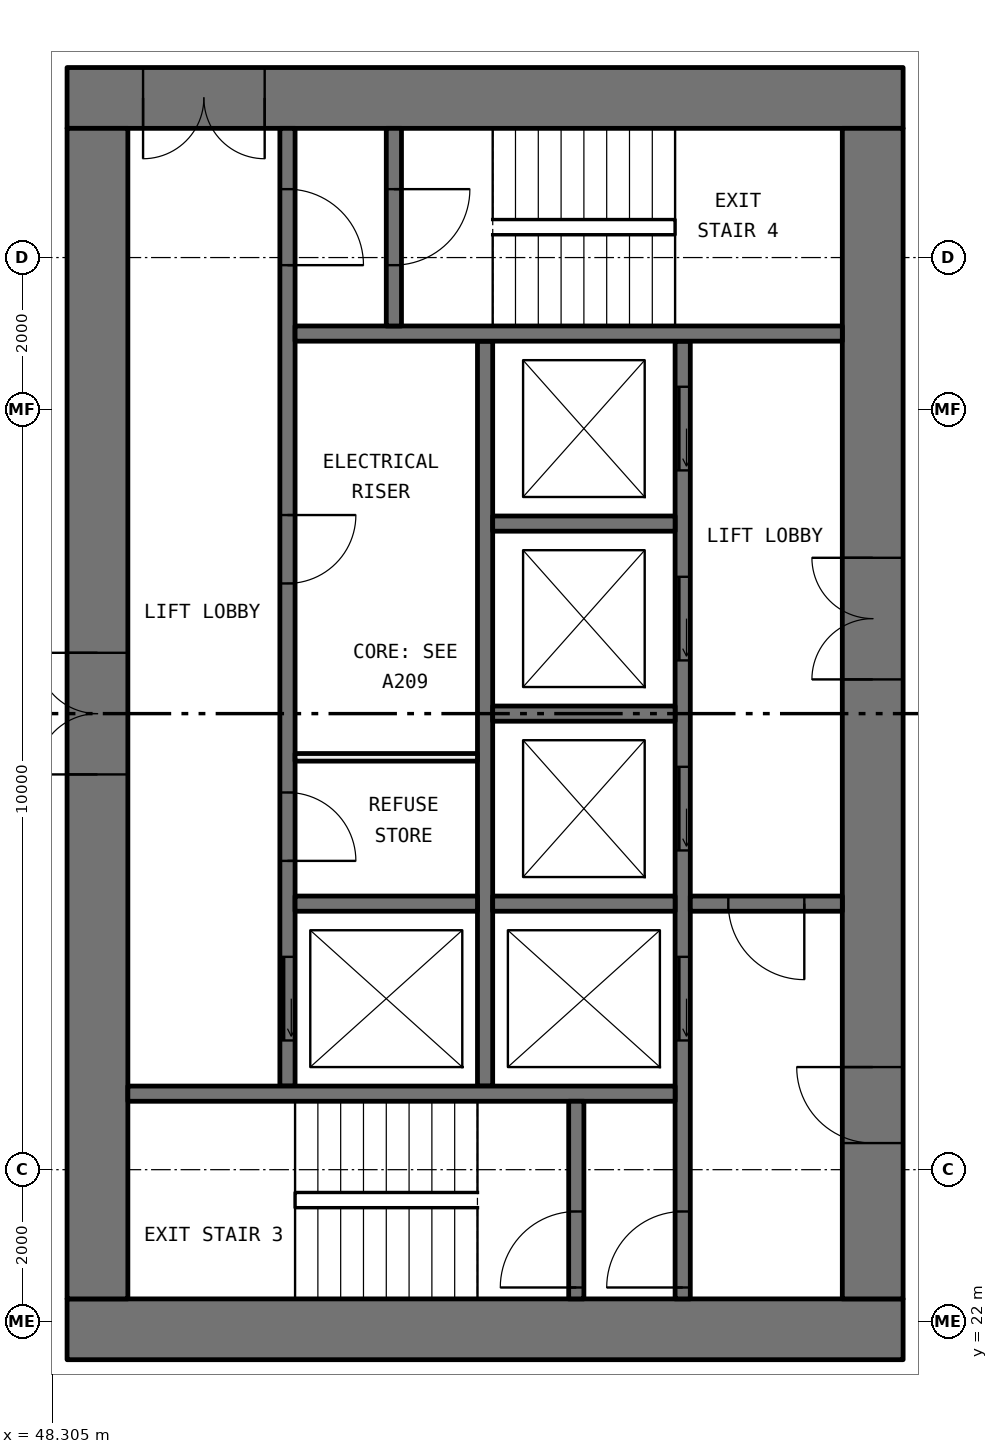
"""IFC4 building model, lengths in metres.
Left out: names, types, materials, properties, quantities, classifications, styles, units other than length and angle.
Written with IfcOpenShell. Run it as: python <this file> out.ifc"""

import sys

from ifc_helpers import new_model, si_unit, direction, frame, frame_2d, origin, place, context, subcontext, project, spatial, rectangle, extrude, element, fill, save


model = new_model("IFC4")
c1 = context("Model", 3, precision=1e-05, world=origin(), true_north=direction((0.0, 1.0)))
c2 = subcontext(c1, "Body", "Model", "MODEL_VIEW")
j1 = project(units=[si_unit("LENGTHUNIT", "METRE"), si_unit("PLANEANGLEUNIT", "RADIAN")], contexts=[c1])
p1 = place(None, origin())
s1 = spatial("IfcSite", under=j1, at=p1, CompositionType="ELEMENT")
p2 = place(p1, origin())
s2 = spatial("IfcBuilding", under=s1, at=p2, CompositionType="ELEMENT")
p3 = place(p2, frame((0.0, 0.0, 40.35)))
s3 = spatial("IfcBuildingStorey", under=s2, at=p3, CompositionType="ELEMENT", Elevation=40.35)
p4 = place(p3, frame((59.5, 21.9, 0.0), z_axis=(0.0, 0.0, 1.0), x_axis=(-1.0, 0.0, 0.0)))
e1 = element("IfcWall", 1, at=p4, inside=s3, PredefinedType="SHEAR", context=c2, shape_type="SweptSolid", body=[
    extrude(rectangle(XDim=11.0, YDim=0.8, at=frame_2d((5.5, 0.0))), origin(), (0.0, 0.0, 1.0), 3.05),
])
p5 = place(p3, frame((59.5, 38.1, 0.0), z_axis=(0.0, 0.0, 1.0), x_axis=(-1.0, 0.0, 0.0)))
e2 = element("IfcWall", 2, at=p5, inside=s3, PredefinedType="SHEAR", context=c2, shape_type="SweptSolid", body=[
    extrude(rectangle(XDim=11.0, YDim=0.8, at=frame_2d((5.5, 0.0))), origin(), (0.0, 0.0, 1.0), 3.05),
])
p6 = place(p5, frame((8.4, 0.0, 0.0)))
e3 = element("IfcOpeningElement", 3, at=p6, cuts=e2, PredefinedType="OPENING", context=c2, shape_type="SweptSolid", body=[
    extrude(rectangle(XDim=1.6, YDim=2.1, at=frame_2d((0.8, 1.05))), frame((0.0, 0.41, 0.0), z_axis=(0.0, -1.0, 0.0), x_axis=(1.0, 0.0, 0.0)), (0.0, 0.0, 1.0), 0.82),
])
p7 = place(p3, frame((59.1, 22.3, 0.0), z_axis=(0.0, 0.0, 1.0), x_axis=(0.0, 1.0, 0.0)))
e4 = element("IfcWall", 4, at=p7, inside=s3, PredefinedType="SHEAR", context=c2, shape_type="SweptSolid", body=[
    extrude(rectangle(XDim=15.4, YDim=0.8, at=frame_2d((7.7, 0.0))), origin(), (0.0, 0.0, 1.0), 3.05),
])
p8 = place(p7, frame((8.15, 0.0, 0.0)))
e5 = element("IfcOpeningElement", 5, at=p8, cuts=e4, PredefinedType="OPENING", context=c2, shape_type="SweptSolid", body=[
    extrude(rectangle(XDim=1.6, YDim=2.1, at=frame_2d((0.8, 1.05))), frame((0.0, 0.41, 0.0), z_axis=(0.0, -1.0, 0.0), x_axis=(1.0, 0.0, 0.0)), (0.0, 0.0, 1.0), 0.82),
])
p9 = place(p7, frame((2.05, 0.0, 0.0)))
e6 = element("IfcOpeningElement", 6, at=p9, cuts=e4, PredefinedType="OPENING", context=c2, shape_type="SweptSolid", body=[
    extrude(rectangle(XDim=1.0, YDim=2.1, at=frame_2d((0.5, 1.05))), frame((0.0, 0.41, 0.0), z_axis=(0.0, -1.0, 0.0), x_axis=(1.0, 0.0, 0.0)), (0.0, 0.0, 1.0), 0.82),
])
p10 = place(p3, frame((48.9, 22.3, 0.0), z_axis=(0.0, 0.0, 1.0), x_axis=(0.0, 1.0, 0.0)))
e7 = element("IfcWall", 7, at=p10, inside=s3, PredefinedType="SHEAR", context=c2, shape_type="SweptSolid", body=[
    extrude(rectangle(XDim=15.4, YDim=0.8, at=frame_2d((7.7, 0.0))), origin(), (0.0, 0.0, 1.0), 3.05),
])
p11 = place(p10, frame((6.9, 0.0, 0.0)))
e8 = element("IfcOpeningElement", 8, at=p11, cuts=e7, PredefinedType="OPENING", context=c2, shape_type="SweptSolid", body=[
    extrude(rectangle(XDim=1.6, YDim=2.1, at=frame_2d((0.8, 1.05))), frame((0.0, 0.41, 0.0), z_axis=(0.0, -1.0, 0.0), x_axis=(1.0, 0.0, 0.0)), (0.0, 0.0, 1.0), 0.82),
])
p12 = place(p3, frame((56.6, 22.3, 0.0), z_axis=(0.0, 0.0, 1.0), x_axis=(0.0, 1.0, 0.0)))
e9 = element("IfcWall", 9, at=p12, inside=s3, PredefinedType="SOLIDWALL", context=c2, shape_type="SweptSolid", body=[
    extrude(rectangle(XDim=12.6, YDim=0.2, at=frame_2d((6.3, 0.0))), origin(), (0.0, 0.0, 1.0), 3.05),
])
p13 = place(p12, frame((3.4, 0.0, 0.0)))
e10 = element("IfcOpeningElement", 10, at=p13, cuts=e9, PredefinedType="OPENING", context=c2, shape_type="SweptSolid", body=[
    extrude(rectangle(XDim=1.1, YDim=2.1, at=frame_2d((0.55, 1.05))), frame((0.0, 0.11, 0.0), z_axis=(0.0, -1.0, 0.0), x_axis=(1.0, 0.0, 0.0)), (0.0, 0.0, 1.0), 0.22),
])
p14 = place(p12, frame((5.9, 0.0, 0.0)))
e11 = element("IfcOpeningElement", 11, at=p14, cuts=e9, PredefinedType="OPENING", context=c2, shape_type="SweptSolid", body=[
    extrude(rectangle(XDim=1.1, YDim=2.1, at=frame_2d((0.55, 1.05))), frame((0.0, 0.11, 0.0), z_axis=(0.0, -1.0, 0.0), x_axis=(1.0, 0.0, 0.0)), (0.0, 0.0, 1.0), 0.22),
])
p15 = place(p12, frame((8.4, 0.0, 0.0)))
e12 = element("IfcOpeningElement", 12, at=p15, cuts=e9, PredefinedType="OPENING", context=c2, shape_type="SweptSolid", body=[
    extrude(rectangle(XDim=1.1, YDim=2.1, at=frame_2d((0.55, 1.05))), frame((0.0, 0.11, 0.0), z_axis=(0.0, -1.0, 0.0), x_axis=(1.0, 0.0, 0.0)), (0.0, 0.0, 1.0), 0.22),
])
p16 = place(p12, frame((10.9, 0.0, 0.0)))
e13 = element("IfcOpeningElement", 13, at=p16, cuts=e9, PredefinedType="OPENING", context=c2, shape_type="SweptSolid", body=[
    extrude(rectangle(XDim=1.1, YDim=2.1, at=frame_2d((0.55, 1.05))), frame((0.0, 0.11, 0.0), z_axis=(0.0, -1.0, 0.0), x_axis=(1.0, 0.0, 0.0)), (0.0, 0.0, 1.0), 0.22),
])
p17 = place(p12, frame((0.15, 0.0, 0.0)))
e14 = element("IfcOpeningElement", 14, at=p17, cuts=e9, PredefinedType="OPENING", context=c2, shape_type="SweptSolid", body=[
    extrude(rectangle(XDim=1.0, YDim=2.1, at=frame_2d((0.5, 1.05))), frame((0.0, 0.11, 0.0), z_axis=(0.0, -1.0, 0.0), x_axis=(1.0, 0.0, 0.0)), (0.0, 0.0, 1.0), 0.22),
])
p18 = place(p3, frame((51.4, 25.1, 0.0), z_axis=(0.0, 0.0, 1.0), x_axis=(0.0, 1.0, 0.0)))
e15 = element("IfcWall", 15, at=p18, inside=s3, PredefinedType="SOLIDWALL", context=c2, shape_type="SweptSolid", body=[
    extrude(rectangle(XDim=12.6, YDim=0.2, at=frame_2d((6.3, 0.0))), origin(), (0.0, 0.0, 1.0), 3.05),
])
p19 = place(p18, frame((0.6, 0.0, 0.0)))
e16 = element("IfcOpeningElement", 16, at=p19, cuts=e15, PredefinedType="OPENING", context=c2, shape_type="SweptSolid", body=[
    extrude(rectangle(XDim=1.1, YDim=2.1, at=frame_2d((0.55, 1.05))), frame((0.0, 0.11, 0.0), z_axis=(0.0, -1.0, 0.0), x_axis=(1.0, 0.0, 0.0)), (0.0, 0.0, 1.0), 0.22),
])
p20 = place(p18, frame((10.8, 0.0, 0.0)))
e17 = element("IfcOpeningElement", 17, at=p20, cuts=e15, PredefinedType="OPENING", context=c2, shape_type="SweptSolid", body=[
    extrude(rectangle(XDim=1.0, YDim=2.1, at=frame_2d((0.5, 1.05))), frame((0.0, 0.11, 0.0), z_axis=(0.0, -1.0, 0.0), x_axis=(1.0, 0.0, 0.0)), (0.0, 0.0, 1.0), 0.22),
])
p21 = place(p18, frame((2.962, 0.0, 0.0)))
e18 = element("IfcOpeningElement", 18, at=p21, cuts=e15, PredefinedType="OPENING", context=c2, shape_type="SweptSolid", body=[
    extrude(rectangle(XDim=0.9, YDim=2.1, at=frame_2d((0.45, 1.05))), frame((0.0, 0.11, 0.0), z_axis=(0.0, -1.0, 0.0), x_axis=(1.0, 0.0, 0.0)), (0.0, 0.0, 1.0), 0.22),
])
p22 = place(p18, frame((6.613, 0.0, 0.0)))
e19 = element("IfcOpeningElement", 19, at=p22, cuts=e15, PredefinedType="OPENING", context=c2, shape_type="SweptSolid", body=[
    extrude(rectangle(XDim=0.9, YDim=2.1, at=frame_2d((0.45, 1.05))), frame((0.0, 0.11, 0.0), z_axis=(0.0, -1.0, 0.0), x_axis=(1.0, 0.0, 0.0)), (0.0, 0.0, 1.0), 0.22),
])
p23 = place(p3, frame((54.0, 25.1, 0.0), z_axis=(0.0, 0.0, 1.0), x_axis=(0.0, 1.0, 0.0)))
e20 = element("IfcWall", 20, at=p23, inside=s3, PredefinedType="SOLIDWALL", context=c2, shape_type="SweptSolid", body=[
    extrude(rectangle(XDim=9.8, YDim=0.2, at=frame_2d((4.9, 0.0))), origin(), (0.0, 0.0, 1.0), 3.05),
])
for number, where, z_axis, x_axis in (
    (21, (56.5, 25.0, 0.0), (0.0, 0.0, 1.0), (-1.0, 0.0, 0.0)),
    (22, (58.7, 35.0, 0.0), (0.0, 0.0, 1.0), (-1.0, 0.0, 0.0)),
):
    element("IfcWall", number, at=place(p3, frame(where, z_axis=z_axis, x_axis=x_axis)), inside=s3, PredefinedType="SOLIDWALL", context=c2, shape_type="SweptSolid", body=[
        extrude(rectangle(XDim=7.2, YDim=0.2, at=frame_2d((3.6, 0.0))), origin(), (0.0, 0.0, 1.0), 3.05),
    ])
p24 = place(p3, frame((58.7, 27.5, 0.0), z_axis=(0.0, 0.0, 1.0), x_axis=(-1.0, 0.0, 0.0)))
e23 = element("IfcWall", 23, at=p24, inside=s3, PredefinedType="SOLIDWALL", context=c2, shape_type="SweptSolid", body=[
    extrude(rectangle(XDim=2.0, YDim=0.2, at=frame_2d((1.0, 0.0))), origin(), (0.0, 0.0, 1.0), 3.05),
])
p25 = place(p24, frame((0.5, 0.0, 0.0)))
e24 = element("IfcOpeningElement", 24, at=p25, cuts=e23, PredefinedType="OPENING", context=c2, shape_type="SweptSolid", body=[
    extrude(rectangle(XDim=1.0, YDim=2.1, at=frame_2d((0.5, 1.05))), frame((0.0, 0.11, 0.0), z_axis=(0.0, -1.0, 0.0), x_axis=(1.0, 0.0, 0.0)), (0.0, 0.0, 1.0), 0.22),
])
p26 = place(p3, frame((55.2, 22.3, 0.0), z_axis=(0.0, 0.0, 1.0), x_axis=(0.0, 1.0, 0.0)))
e25 = element("IfcWall", 25, at=p26, inside=s3, PredefinedType="SOLIDWALL", context=c2, shape_type="SweptSolid", body=[
    extrude(rectangle(XDim=2.6, YDim=0.2, at=frame_2d((1.3, 0.0))), origin(), (0.0, 0.0, 1.0), 3.05),
])
p27 = place(p26, frame((0.15, 0.0, 0.0)))
e26 = element("IfcOpeningElement", 26, at=p27, cuts=e25, PredefinedType="OPENING", context=c2, shape_type="SweptSolid", body=[
    extrude(rectangle(XDim=1.0, YDim=2.1, at=frame_2d((0.5, 1.05))), frame((0.0, 0.11, 0.0), z_axis=(0.0, -1.0, 0.0), x_axis=(1.0, 0.0, 0.0)), (0.0, 0.0, 1.0), 0.22),
])
p28 = place(p3, frame((52.8, 35.1, 0.0), z_axis=(0.0, 0.0, 1.0), x_axis=(0.0, 1.0, 0.0)))
e27 = element("IfcWall", 27, at=p28, inside=s3, PredefinedType="SOLIDWALL", context=c2, shape_type="SweptSolid", body=[
    extrude(rectangle(XDim=2.6, YDim=0.2, at=frame_2d((1.3, 0.0))), origin(), (0.0, 0.0, 1.0), 3.05),
])
p29 = place(p28, frame((0.8, 0.0, 0.0)))
e28 = element("IfcOpeningElement", 28, at=p29, cuts=e27, PredefinedType="OPENING", context=c2, shape_type="SweptSolid", body=[
    extrude(rectangle(XDim=1.0, YDim=2.1, at=frame_2d((0.5, 1.05))), frame((0.0, 0.11, 0.0), z_axis=(0.0, -1.0, 0.0), x_axis=(1.0, 0.0, 0.0)), (0.0, 0.0, 1.0), 0.22),
])
for number, where, z_axis, x_axis in (
    (29, (56.5, 27.5, 0.0), (0.0, 0.0, 1.0), (-1.0, 0.0, 0.0)),
    (30, (56.5, 30.0, 0.0), (0.0, 0.0, 1.0), (-1.0, 0.0, 0.0)),
    (31, (56.5, 32.5, 0.0), (0.0, 0.0, 1.0), (-1.0, 0.0, 0.0)),
    (32, (53.9, 27.5, 0.0), (0.0, 0.0, 1.0), (-1.0, 0.0, 0.0)),
):
    element("IfcWall", number, at=place(p3, frame(where, z_axis=z_axis, x_axis=x_axis)), inside=s3, PredefinedType="SOLIDWALL", context=c2, shape_type="SweptSolid", body=[
        extrude(rectangle(XDim=2.4, YDim=0.2, at=frame_2d((1.2, 0.0))), origin(), (0.0, 0.0, 1.0), 3.05),
    ])
p30 = place(p3, frame((53.9, 29.425, 0.0), z_axis=(0.0, 0.0, 1.0), x_axis=(-1.0, 0.0, 0.0)))
e33 = element("IfcWall", 33, at=p30, inside=s3, PredefinedType="PARTITIONING", context=c2, shape_type="SweptSolid", body=[
    extrude(rectangle(XDim=2.4, YDim=0.1, at=frame_2d((1.2, 0.0))), origin(), (0.0, 0.0, 1.0), 3.05),
])
p31 = place(p19, origin())
e34 = element("IfcDoor", 34, at=p31, inside=s3, OperationType="SLIDING_TO_LEFT", PredefinedType="DOOR", context=c2, shape_type="SweptSolid", body=[
    extrude(rectangle(XDim=1.1, YDim=2.1, at=frame_2d((0.55, 1.05))), frame((0.0, 0.025, 0.0), z_axis=(0.0, -1.0, 0.0), x_axis=(1.0, 0.0, 0.0)), (0.0, 0.0, 1.0), 0.05),
])
fill(e16, e34)
p32 = place(p13, origin())
e35 = element("IfcDoor", 35, at=p32, inside=s3, OperationType="SLIDING_TO_LEFT", PredefinedType="DOOR", context=c2, shape_type="SweptSolid", body=[
    extrude(rectangle(XDim=1.1, YDim=2.1, at=frame_2d((0.55, 1.05))), frame((0.0, 0.025, 0.0), z_axis=(0.0, -1.0, 0.0), x_axis=(1.0, 0.0, 0.0)), (0.0, 0.0, 1.0), 0.05),
])
fill(e10, e35)
p33 = place(p14, origin())
e36 = element("IfcDoor", 36, at=p33, inside=s3, OperationType="SLIDING_TO_LEFT", PredefinedType="DOOR", context=c2, shape_type="SweptSolid", body=[
    extrude(rectangle(XDim=1.1, YDim=2.1, at=frame_2d((0.55, 1.05))), frame((0.0, 0.025, 0.0), z_axis=(0.0, -1.0, 0.0), x_axis=(1.0, 0.0, 0.0)), (0.0, 0.0, 1.0), 0.05),
])
fill(e11, e36)
p34 = place(p15, origin())
e37 = element("IfcDoor", 37, at=p34, inside=s3, OperationType="SLIDING_TO_LEFT", PredefinedType="DOOR", context=c2, shape_type="SweptSolid", body=[
    extrude(rectangle(XDim=1.1, YDim=2.1, at=frame_2d((0.55, 1.05))), frame((0.0, 0.025, 0.0), z_axis=(0.0, -1.0, 0.0), x_axis=(1.0, 0.0, 0.0)), (0.0, 0.0, 1.0), 0.05),
])
fill(e12, e37)
p35 = place(p16, origin())
e38 = element("IfcDoor", 38, at=p35, inside=s3, OperationType="SLIDING_TO_LEFT", PredefinedType="DOOR", context=c2, shape_type="SweptSolid", body=[
    extrude(rectangle(XDim=1.1, YDim=2.1, at=frame_2d((0.55, 1.05))), frame((0.0, 0.025, 0.0), z_axis=(0.0, -1.0, 0.0), x_axis=(1.0, 0.0, 0.0)), (0.0, 0.0, 1.0), 0.05),
])
fill(e13, e38)
p36 = place(p27, origin())
e39 = element("IfcDoor", 39, at=p36, inside=s3, OperationType="SINGLE_SWING_RIGHT", PredefinedType="DOOR", context=c2, shape_type="SweptSolid", body=[
    extrude(rectangle(XDim=1.0, YDim=2.1, at=frame_2d((0.5, 1.05))), frame((0.0, 0.025, 0.0), z_axis=(0.0, -1.0, 0.0), x_axis=(1.0, 0.0, 0.0)), (0.0, 0.0, 1.0), 0.05),
])
fill(e26, e39)
p37 = place(p17, origin())
e40 = element("IfcDoor", 40, at=p37, inside=s3, OperationType="SINGLE_SWING_RIGHT", PredefinedType="DOOR", context=c2, shape_type="SweptSolid", body=[
    extrude(rectangle(XDim=1.0, YDim=2.1, at=frame_2d((0.5, 1.05))), frame((0.0, 0.025, 0.0), z_axis=(0.0, -1.0, 0.0), x_axis=(1.0, 0.0, 0.0)), (0.0, 0.0, 1.0), 0.05),
])
fill(e14, e40)
p38 = place(p20, frame((1.0, 0.0, 0.0), x_axis=(-1.0, 0.0, 0.0)))
e41 = element("IfcDoor", 41, at=p38, inside=s3, OperationType="SINGLE_SWING_LEFT", PredefinedType="DOOR", context=c2, shape_type="SweptSolid", body=[
    extrude(rectangle(XDim=1.0, YDim=2.1, at=frame_2d((0.5, 1.05))), frame((0.0, 0.025, 0.0), z_axis=(0.0, -1.0, 0.0), x_axis=(1.0, 0.0, 0.0)), (0.0, 0.0, 1.0), 0.05),
])
fill(e17, e41)
p39 = place(p29, frame((1.0, 0.0, 0.0), x_axis=(-1.0, 0.0, 0.0)))
e42 = element("IfcDoor", 42, at=p39, inside=s3, OperationType="SINGLE_SWING_RIGHT", PredefinedType="DOOR", context=c2, shape_type="SweptSolid", body=[
    extrude(rectangle(XDim=1.0, YDim=2.1, at=frame_2d((0.5, 1.05))), frame((0.0, 0.025, 0.0), z_axis=(0.0, -1.0, 0.0), x_axis=(1.0, 0.0, 0.0)), (0.0, 0.0, 1.0), 0.05),
])
fill(e28, e42)
p40 = place(p25, origin())
e43 = element("IfcDoor", 43, at=p40, inside=s3, OperationType="SINGLE_SWING_RIGHT", PredefinedType="DOOR", context=c2, shape_type="SweptSolid", body=[
    extrude(rectangle(XDim=1.0, YDim=2.1, at=frame_2d((0.5, 1.05))), frame((0.0, 0.025, 0.0), z_axis=(0.0, -1.0, 0.0), x_axis=(1.0, 0.0, 0.0)), (0.0, 0.0, 1.0), 0.05),
])
fill(e24, e43)
p41 = place(p8, origin())
e44 = element("IfcDoor", 44, at=p41, inside=s3, OperationType="DOUBLE_DOOR_SINGLE_SWING", PredefinedType="DOOR", context=c2, shape_type="SweptSolid", body=[
    extrude(rectangle(XDim=1.6, YDim=2.1, at=frame_2d((0.8, 1.05))), frame((0.0, 0.025, 0.0), z_axis=(0.0, -1.0, 0.0), x_axis=(1.0, 0.0, 0.0)), (0.0, 0.0, 1.0), 0.05),
])
fill(e5, e44)
p42 = place(p9, origin())
e45 = element("IfcDoor", 45, at=p42, inside=s3, OperationType="SINGLE_SWING_LEFT", PredefinedType="DOOR", context=c2, shape_type="SweptSolid", body=[
    extrude(rectangle(XDim=1.0, YDim=2.1, at=frame_2d((0.5, 1.05))), frame((0.0, 0.025, 0.0), z_axis=(0.0, -1.0, 0.0), x_axis=(1.0, 0.0, 0.0)), (0.0, 0.0, 1.0), 0.05),
])
fill(e6, e45)
p43 = place(p6, origin())
e46 = element("IfcDoor", 46, at=p43, inside=s3, OperationType="DOUBLE_DOOR_SINGLE_SWING", PredefinedType="DOOR", context=c2, shape_type="SweptSolid", body=[
    extrude(rectangle(XDim=1.6, YDim=2.1, at=frame_2d((0.8, 1.05))), frame((0.0, 0.025, 0.0), z_axis=(0.0, -1.0, 0.0), x_axis=(1.0, 0.0, 0.0)), (0.0, 0.0, 1.0), 0.05),
])
fill(e3, e46)
p44 = place(p11, origin())
e47 = element("IfcDoor", 47, at=p44, inside=s3, OperationType="DOUBLE_DOOR_SINGLE_SWING", PredefinedType="DOOR", context=c2, shape_type="SweptSolid", body=[
    extrude(rectangle(XDim=1.6, YDim=2.1, at=frame_2d((0.8, 1.05))), frame((0.0, 0.025, 0.0), z_axis=(0.0, -1.0, 0.0), x_axis=(1.0, 0.0, 0.0)), (0.0, 0.0, 1.0), 0.05),
])
fill(e8, e47)
p45 = place(p21, frame((0.9, 0.0, 0.0), x_axis=(-1.0, 0.0, 0.0)))
e48 = element("IfcDoor", 48, at=p45, inside=s3, OperationType="SINGLE_SWING_LEFT", PredefinedType="DOOR", context=c2, shape_type="SweptSolid", body=[
    extrude(rectangle(XDim=0.9, YDim=2.1, at=frame_2d((0.45, 1.05))), frame((0.0, 0.025, 0.0), z_axis=(0.0, -1.0, 0.0), x_axis=(1.0, 0.0, 0.0)), (0.0, 0.0, 1.0), 0.05),
])
fill(e18, e48)
p46 = place(p22, frame((0.9, 0.0, 0.0), x_axis=(-1.0, 0.0, 0.0)))
e49 = element("IfcDoor", 49, at=p46, inside=s3, OperationType="SINGLE_SWING_RIGHT", PredefinedType="DOOR", context=c2, shape_type="SweptSolid", body=[
    extrude(rectangle(XDim=0.9, YDim=2.1, at=frame_2d((0.45, 1.05))), frame((0.0, 0.025, 0.0), z_axis=(0.0, -1.0, 0.0), x_axis=(1.0, 0.0, 0.0)), (0.0, 0.0, 1.0), 0.05),
])
fill(e19, e49)
save(model, sys.argv[1])
